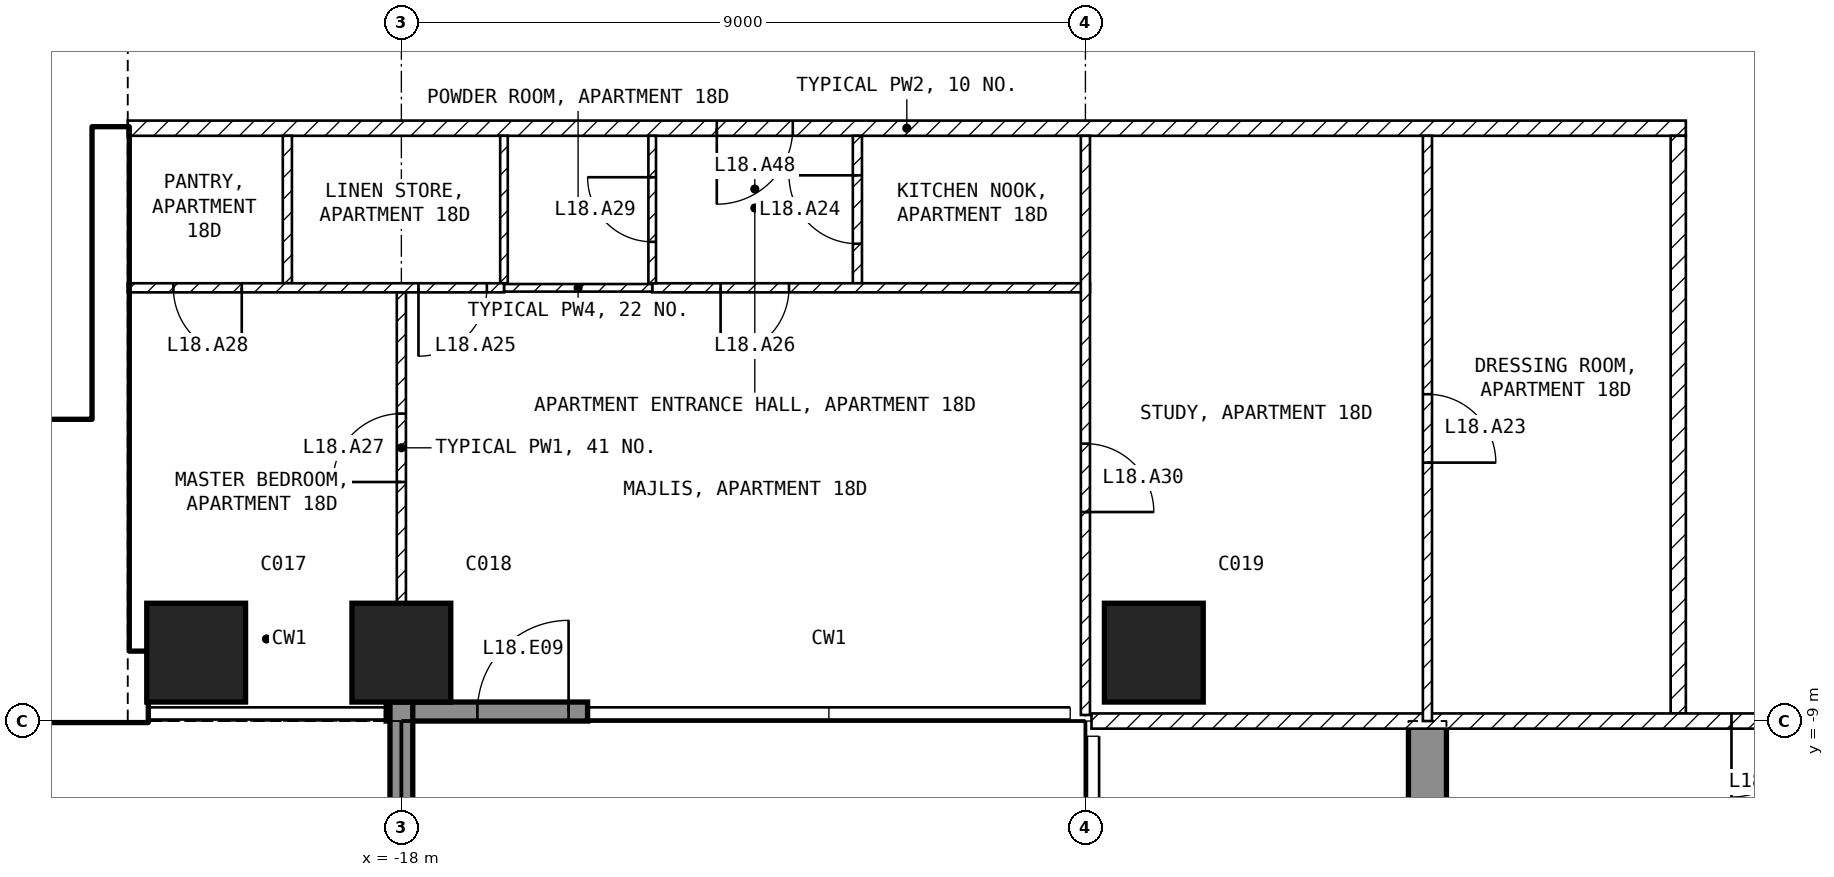
"""IFC4 building model, lengths in metres.
Left out: names, types, materials, properties, quantities, classifications, styles, units other than length and angle.
Written with IfcOpenShell. Run it as: python <this file> out.ifc"""

import sys

from ifc_helpers import new_model, si_unit, direction, frame, frame_2d, origin, origin_2d, place, context, subcontext, project, spatial, polyline, rectangle, outline, extrude, element, fill, save


model = new_model("IFC4")
c1 = context("Model", 3, precision=1e-05, world=origin(), true_north=direction((0.0, 1.0)))
c2 = subcontext(c1, "Body", "Model", "MODEL_VIEW")
j1 = project(units=[si_unit("LENGTHUNIT", "METRE"), si_unit("PLANEANGLEUNIT", "RADIAN")], contexts=[c1])
p1 = place(None, origin())
s1 = spatial("IfcSite", under=j1, at=p1, CompositionType="ELEMENT")
p2 = place(p1, origin())
s2 = spatial("IfcBuilding", under=s1, at=p2, CompositionType="ELEMENT")
p3 = place(p2, frame((0.0, 0.0, 82.0)))
s3 = spatial("IfcBuildingStorey", under=s2, at=p3, CompositionType="ELEMENT", Elevation=82.0)
for number, where, z_axis, x_axis in (
    (1, (-20.7, -8.1, -0.25), (0.0, 0.0, 1.0), (1.0, 0.0, 0.0)),
    (2, (-18.0, -8.1, -0.25), (0.0, 0.0, 1.0), (1.0, 0.0, 0.0)),
    (3, (-8.1, -8.1, -0.25), (0.0, 0.0, 1.0), (1.0, 0.0, 0.0)),
):
    element("IfcColumn", number, at=place(p3, frame(where, z_axis=z_axis, x_axis=x_axis)), inside=s3, PredefinedType="COLUMN", context=c2, shape_type="SweptSolid", body=[
        extrude(rectangle(XDim=1.3, YDim=1.3, at=origin_2d()), origin(), (0.0, 0.0, 1.0), 3.5),
    ])
p4 = place(p3, frame((-4.75, -25.45, -0.25), z_axis=(1.0, 0.0, 0.0), x_axis=(0.0, 1.0, 0.0)))
e4 = element("IfcWall", 4, at=p4, inside=s3, PredefinedType="SHEAR", context=c2, shape_type="SweptSolid", body=[
    extrude(outline(polyline([(0.0, 0.0), (4.15, 0.0), (4.15, 2.65), (6.55, 2.65), (6.55, 0.0), (11.95, 0.0), (11.95, 2.65), (14.35, 2.65), (14.35, 0.0), (16.45, 0.0), (16.45, 3.5), (0.0, 3.5), (0.0, 0.0)])), origin(), (0.0, 0.0, 1.0), 0.5),
])
p5 = place(p3, frame((-18.2, -8.875, 0.0), z_axis=(0.0, 0.0, 1.0), x_axis=(1.0, 0.0, 0.0)))
e5 = element("IfcWall", 5, at=p5, inside=s3, PredefinedType="SOLIDWALL", context=c2, shape_type="SweptSolid", body=[
    extrude(rectangle(XDim=2.65, YDim=0.25, at=frame_2d((1.325, 0.0))), origin(), (0.0, 0.0, 1.0), 3.25),
])
p6 = place(p5, frame((1.2, 0.0, 0.0)))
e6 = element("IfcOpeningElement", 6, at=p6, cuts=e5, PredefinedType="OPENING", context=c2, shape_type="SweptSolid", body=[
    extrude(rectangle(XDim=1.2, YDim=2.4, at=frame_2d((0.6, 1.2))), frame((0.0, 0.135, 0.0), z_axis=(0.0, -1.0, 0.0), x_axis=(1.0, 0.0, 0.0)), (0.0, 0.0, 1.0), 0.27),
])
p7 = place(p3, frame((-18.0, -8.75, 0.0), z_axis=(0.0, 0.0, 1.0), x_axis=(0.0, -1.0, 0.0)))
e7 = element("IfcWall", 7, at=p7, inside=s3, PredefinedType="SOLIDWALL", context=c2, shape_type="SweptSolid", body=[
    extrude(rectangle(XDim=2.95, YDim=0.3, at=frame_2d((1.475, 0.0))), origin(), (0.0, 0.0, 1.0), 3.25),
])
p8 = place(p3, frame((-32.4, -8.55, 0.0), z_axis=(0.0, 0.0, 1.0), x_axis=(1.0, 0.0, 0.0)))
e8 = element("IfcWall", 8, at=p8, inside=s3, PredefinedType="SHEAR", context=c2, shape_type="SweptSolid", body=[
    extrude(rectangle(XDim=11.05, YDim=0.9, at=frame_2d((5.525, 0.0))), origin(), (0.0, 0.0, 1.0), 3.25),
])
p9 = place(p3, frame((-21.825, -8.1, 0.0), z_axis=(0.0, 0.0, 1.0), x_axis=(0.0, 1.0, 0.0)))
e9 = element("IfcWall", 9, at=p9, inside=s3, PredefinedType="SHEAR", context=c2, shape_type="SweptSolid", body=[
    extrude(rectangle(XDim=6.9, YDim=0.45, at=frame_2d((3.45, 0.0))), origin(), (0.0, 0.0, 1.0), 3.25),
])
p10 = place(p3, frame((-28.35, -5.15, 0.0), z_axis=(0.0, 0.0, 1.0), x_axis=(1.0, 0.0, 0.0)))
e10 = element("IfcWall", 10, at=p10, inside=s3, PredefinedType="SOLIDWALL", context=c2, shape_type="SweptSolid", body=[
    extrude(rectangle(XDim=6.3, YDim=0.2, at=frame_2d((3.15, 0.0))), origin(), (0.0, 0.0, 1.0), 3.25),
])
p11 = place(p10, frame((5.1, 0.0, 0.0)))
e11 = element("IfcOpeningElement", 11, at=p11, cuts=e10, PredefinedType="OPENING", context=c2, shape_type="SweptSolid", body=[
    extrude(rectangle(XDim=1.0, YDim=2.1, at=frame_2d((0.5, 1.05))), frame((0.0, 0.11, 0.0), z_axis=(0.0, -1.0, 0.0), x_axis=(1.0, 0.0, 0.0)), (0.0, 0.0, 1.0), 0.22),
])
p12 = place(p3, frame((-1.1, -1.2, 0.0), z_axis=(0.0, 0.0, 1.0), x_axis=(-1.0, 0.0, 0.0)))
e12 = element("IfcWall", 12, at=p12, inside=s3, PredefinedType="PARTITIONING", context=c2, shape_type="SweptSolid", body=[
    extrude(rectangle(XDim=20.5, YDim=0.2, at=frame_2d((10.25, 0.0))), origin(), (0.0, 0.0, 1.0), 3.25),
])
p13 = place(p12, frame((11.75, 0.0, 0.0)))
e13 = element("IfcOpeningElement", 13, at=p13, cuts=e12, PredefinedType="OPENING", context=c2, shape_type="SweptSolid", body=[
    extrude(rectangle(XDim=1.0, YDim=2.1, at=frame_2d((0.5, 1.05))), frame((0.0, 0.11, 0.0), z_axis=(0.0, -1.0, 0.0), x_axis=(1.0, 0.0, 0.0)), (0.0, 0.0, 1.0), 0.22),
])
p14 = place(p3, frame((-1.2, -8.9, 0.0), z_axis=(0.0, 0.0, 1.0), x_axis=(0.0, 1.0, 0.0)))
e14 = element("IfcWall", 14, at=p14, inside=s3, PredefinedType="PARTITIONING", context=c2, shape_type="SweptSolid", body=[
    extrude(rectangle(XDim=7.6, YDim=0.2, at=frame_2d((3.8, 0.0))), origin(), (0.0, 0.0, 1.0), 3.25),
])
p15 = place(p3, frame((8.92, -9.0, 0.0), z_axis=(0.0, 0.0, 1.0), x_axis=(-1.0, 0.0, 0.0)))
e15 = element("IfcWall", 15, at=p15, inside=s3, PredefinedType="PARTITIONING", context=c2, shape_type="SweptSolid", body=[
    extrude(rectangle(XDim=17.84, YDim=0.2, at=frame_2d((8.92, 0.0))), origin(), (0.0, 0.0, 1.0), 3.25),
])
p16 = place(p15, frame((8.42, 0.0, 0.0)))
e16 = element("IfcOpeningElement", 16, at=p16, cuts=e15, PredefinedType="OPENING", context=c2, shape_type="SweptSolid", body=[
    extrude(rectangle(XDim=1.0, YDim=2.1, at=frame_2d((0.5, 1.05))), frame((0.0, 0.11, 0.0), z_axis=(0.0, -1.0, 0.0), x_axis=(1.0, 0.0, 0.0)), (0.0, 0.0, 1.0), 0.22),
])
p17 = place(p3, frame((-12.0, -3.24, 0.0), z_axis=(0.0, 0.0, 1.0), x_axis=(0.0, 1.0, 0.0)))
e17 = element("IfcWall", 17, at=p17, inside=s3, PredefinedType="PARTITIONING", context=c2, shape_type="SweptSolid", body=[
    extrude(rectangle(XDim=1.94, YDim=0.12, at=frame_2d((0.97, 0.0))), origin(), (0.0, 0.0, 1.0), 3.25),
])
p18 = place(p17, frame((0.52, 0.0, 0.0)))
e18 = element("IfcOpeningElement", 18, at=p18, cuts=e17, PredefinedType="OPENING", context=c2, shape_type="SweptSolid", body=[
    extrude(rectangle(XDim=0.9, YDim=2.1, at=frame_2d((0.45, 1.05))), frame((0.0, 0.07, 0.0), z_axis=(0.0, -1.0, 0.0), x_axis=(1.0, 0.0, 0.0)), (0.0, 0.0, 1.0), 0.14),
])
p19 = place(p3, frame((-8.94, -3.3, 0.0), z_axis=(0.0, 0.0, 1.0), x_axis=(-1.0, 0.0, 0.0)))
e19 = element("IfcWall", 19, at=p19, inside=s3, PredefinedType="PARTITIONING", context=c2, shape_type="SweptSolid", body=[
    extrude(rectangle(XDim=5.76, YDim=0.12, at=frame_2d((2.88, 0.0))), origin(), (0.0, 0.0, 1.0), 3.25),
])
p20 = place(p19, frame((3.96, 0.0, 0.0)))
e20 = element("IfcOpeningElement", 20, at=p20, cuts=e19, PredefinedType="OPENING", context=c2, shape_type="SweptSolid", body=[
    extrude(rectangle(XDim=0.9, YDim=2.1, at=frame_2d((0.45, 1.05))), frame((0.0, 0.07, 0.0), z_axis=(0.0, -1.0, 0.0), x_axis=(1.0, 0.0, 0.0)), (0.0, 0.0, 1.0), 0.14),
])
p21 = place(p3, frame((-9.0, -1.3, 0.0), z_axis=(0.0, 0.0, 1.0), x_axis=(0.0, -1.0, 0.0)))
e21 = element("IfcWall", 21, at=p21, inside=s3, PredefinedType="PARTITIONING", context=c2, shape_type="SweptSolid", body=[
    extrude(rectangle(XDim=7.62, YDim=0.12, at=frame_2d((3.81, 0.0))), origin(), (0.0, 0.0, 1.0), 3.25),
])
p22 = place(p21, frame((4.05, 0.0, 0.0)))
e22 = element("IfcOpeningElement", 22, at=p22, cuts=e21, PredefinedType="OPENING", context=c2, shape_type="SweptSolid", body=[
    extrude(rectangle(XDim=0.9, YDim=2.1, at=frame_2d((0.45, 1.05))), frame((0.0, 0.07, 0.0), z_axis=(0.0, -1.0, 0.0), x_axis=(1.0, 0.0, 0.0)), (0.0, 0.0, 1.0), 0.14),
])
p23 = place(p3, frame((-14.7, -3.24, 0.0), z_axis=(0.0, 0.0, 1.0), x_axis=(0.0, 1.0, 0.0)))
e23 = element("IfcWall", 23, at=p23, inside=s3, PredefinedType="PARTITIONING", context=c2, shape_type="SweptSolid", body=[
    extrude(rectangle(XDim=1.94, YDim=0.1, at=frame_2d((0.97, 0.0))), origin(), (0.0, 0.0, 1.0), 3.25),
])
p24 = place(p23, frame((0.545, 0.0, 0.0)))
e24 = element("IfcOpeningElement", 24, at=p24, cuts=e23, PredefinedType="OPENING", context=c2, shape_type="SweptSolid", body=[
    extrude(rectangle(XDim=0.85, YDim=2.1, at=frame_2d((0.425, 1.05))), frame((0.0, 0.06, 0.0), z_axis=(0.0, -1.0, 0.0), x_axis=(1.0, 0.0, 0.0)), (0.0, 0.0, 1.0), 0.12),
])
p25 = place(p3, frame((-16.65, -3.24, 0.0), z_axis=(0.0, 0.0, 1.0), x_axis=(0.0, 1.0, 0.0)))
e25 = element("IfcWall", 25, at=p25, inside=s3, PredefinedType="PARTITIONING", context=c2, shape_type="SweptSolid", body=[
    extrude(rectangle(XDim=1.94, YDim=0.1, at=frame_2d((0.97, 0.0))), origin(), (0.0, 0.0, 1.0), 3.25),
])
p26 = place(p3, frame((-14.7, -3.3, 0.0), z_axis=(0.0, 0.0, 1.0), x_axis=(-1.0, 0.0, 0.0)))
e26 = element("IfcWall", 26, at=p26, inside=s3, PredefinedType="PARTITIONING", context=c2, shape_type="SweptSolid", body=[
    extrude(rectangle(XDim=1.95, YDim=0.1, at=frame_2d((0.975, 0.0))), origin(), (0.0, 0.0, 1.0), 3.25),
])
p27 = place(p3, frame((-19.5, -3.24, 0.0), z_axis=(0.0, 0.0, 1.0), x_axis=(0.0, 1.0, 0.0)))
e27 = element("IfcWall", 27, at=p27, inside=s3, PredefinedType="PARTITIONING", context=c2, shape_type="SweptSolid", body=[
    extrude(rectangle(XDim=1.94, YDim=0.12, at=frame_2d((0.97, 0.0))), origin(), (0.0, 0.0, 1.0), 3.25),
])
p28 = place(p3, frame((-16.65, -3.3, 0.0), z_axis=(0.0, 0.0, 1.0), x_axis=(-1.0, 0.0, 0.0)))
e28 = element("IfcWall", 28, at=p28, inside=s3, PredefinedType="PARTITIONING", context=c2, shape_type="SweptSolid", body=[
    extrude(rectangle(XDim=4.95, YDim=0.12, at=frame_2d((2.475, 0.0))), origin(), (0.0, 0.0, 1.0), 3.25),
])
p29 = place(p28, frame((0.225, 0.0, 0.0)))
e29 = element("IfcOpeningElement", 29, at=p29, cuts=e28, PredefinedType="OPENING", context=c2, shape_type="SweptSolid", body=[
    extrude(rectangle(XDim=0.9, YDim=2.1, at=frame_2d((0.45, 1.05))), frame((0.0, 0.07, 0.0), z_axis=(0.0, -1.0, 0.0), x_axis=(1.0, 0.0, 0.0)), (0.0, 0.0, 1.0), 0.14),
])
p30 = place(p28, frame((3.45, 0.0, 0.0)))
e30 = element("IfcOpeningElement", 30, at=p30, cuts=e28, PredefinedType="OPENING", context=c2, shape_type="SweptSolid", body=[
    extrude(rectangle(XDim=0.9, YDim=2.1, at=frame_2d((0.45, 1.05))), frame((0.0, 0.07, 0.0), z_axis=(0.0, -1.0, 0.0), x_axis=(1.0, 0.0, 0.0)), (0.0, 0.0, 1.0), 0.14),
])
p31 = place(p3, frame((-18.0, -7.45, 0.0), z_axis=(0.0, 0.0, 1.0), x_axis=(0.0, 1.0, 0.0)))
e31 = element("IfcWall", 31, at=p31, inside=s3, PredefinedType="PARTITIONING", context=c2, shape_type="SweptSolid", body=[
    extrude(rectangle(XDim=4.09, YDim=0.12, at=frame_2d((2.045, 0.0))), origin(), (0.0, 0.0, 1.0), 2.346),
])
p32 = place(p31, frame((1.595, 0.0, 0.0)))
e32 = element("IfcOpeningElement", 32, at=p32, cuts=e31, PredefinedType="OPENING", context=c2, shape_type="SweptSolid", body=[
    extrude(rectangle(XDim=0.9, YDim=2.1, at=frame_2d((0.45, 1.05))), frame((0.0, 0.07, 0.0), z_axis=(0.0, -1.0, 0.0), x_axis=(1.0, 0.0, 0.0)), (0.0, 0.0, 1.0), 0.14),
])
p33 = place(p3, frame((-4.5, -1.3, 0.0), z_axis=(0.0, 0.0, 1.0), x_axis=(0.0, -1.0, 0.0)))
e33 = element("IfcWall", 33, at=p33, inside=s3, PredefinedType="PARTITIONING", context=c2, shape_type="SweptSolid", body=[
    extrude(rectangle(XDim=7.7, YDim=0.12, at=frame_2d((3.85, 0.0))), origin(), (0.0, 0.0, 1.0), 3.25),
])
p34 = place(p33, frame((3.4, 0.0, 0.0)))
e34 = element("IfcOpeningElement", 34, at=p34, cuts=e33, PredefinedType="OPENING", context=c2, shape_type="SweptSolid", body=[
    extrude(rectangle(XDim=0.9, YDim=2.1, at=frame_2d((0.45, 1.05))), frame((0.0, 0.07, 0.0), z_axis=(0.0, -1.0, 0.0), x_axis=(1.0, 0.0, 0.0)), (0.0, 0.0, 1.0), 0.14),
])
p35 = place(p6, origin())
e35 = element("IfcDoor", 35, at=p35, inside=s3, OperationType="SINGLE_SWING_RIGHT", PredefinedType="DOOR", context=c2, shape_type="SweptSolid", body=[
    extrude(rectangle(XDim=1.2, YDim=2.4, at=frame_2d((0.6, 1.2))), frame((0.0, 0.025, 0.0), z_axis=(0.0, -1.0, 0.0), x_axis=(1.0, 0.0, 0.0)), (0.0, 0.0, 1.0), 0.05),
])
fill(e6, e35)
p36 = place(p11, origin())
e36 = element("IfcDoor", 36, at=p36, inside=s3, OperationType="SINGLE_SWING_LEFT", PredefinedType="DOOR", context=c2, shape_type="SweptSolid", body=[
    extrude(rectangle(XDim=1.0, YDim=2.1, at=frame_2d((0.5, 1.05))), frame((0.0, 0.025, 0.0), z_axis=(0.0, -1.0, 0.0), x_axis=(1.0, 0.0, 0.0)), (0.0, 0.0, 1.0), 0.05),
])
fill(e11, e36)
p37 = place(p34, origin())
e37 = element("IfcDoor", 37, at=p37, inside=s3, OperationType="SINGLE_SWING_RIGHT", PredefinedType="DOOR", context=c2, shape_type="SweptSolid", body=[
    extrude(rectangle(XDim=0.9, YDim=2.1, at=frame_2d((0.45, 1.05))), frame((0.0, 0.025, 0.0), z_axis=(0.0, -1.0, 0.0), x_axis=(1.0, 0.0, 0.0)), (0.0, 0.0, 1.0), 0.05),
])
fill(e34, e37)
p38 = place(p18, origin())
e38 = element("IfcDoor", 38, at=p38, inside=s3, OperationType="SINGLE_SWING_RIGHT", PredefinedType="DOOR", context=c2, shape_type="SweptSolid", body=[
    extrude(rectangle(XDim=0.9, YDim=2.1, at=frame_2d((0.45, 1.05))), frame((0.0, 0.025, 0.0), z_axis=(0.0, -1.0, 0.0), x_axis=(1.0, 0.0, 0.0)), (0.0, 0.0, 1.0), 0.05),
])
fill(e18, e38)
p39 = place(p29, origin())
e39 = element("IfcDoor", 39, at=p39, inside=s3, OperationType="SINGLE_SWING_RIGHT", PredefinedType="DOOR", context=c2, shape_type="SweptSolid", body=[
    extrude(rectangle(XDim=0.9, YDim=2.1, at=frame_2d((0.45, 1.05))), frame((0.0, 0.025, 0.0), z_axis=(0.0, -1.0, 0.0), x_axis=(1.0, 0.0, 0.0)), (0.0, 0.0, 1.0), 0.05),
])
fill(e29, e39)
p40 = place(p20, origin())
e40 = element("IfcDoor", 40, at=p40, inside=s3, OperationType="SINGLE_SWING_RIGHT", PredefinedType="DOOR", context=c2, shape_type="SweptSolid", body=[
    extrude(rectangle(XDim=0.9, YDim=2.1, at=frame_2d((0.45, 1.05))), frame((0.0, 0.025, 0.0), z_axis=(0.0, -1.0, 0.0), x_axis=(1.0, 0.0, 0.0)), (0.0, 0.0, 1.0), 0.05),
])
fill(e20, e40)
p41 = place(p32, origin())
e41 = element("IfcDoor", 41, at=p41, inside=s3, OperationType="SINGLE_SWING_LEFT", PredefinedType="DOOR", context=c2, shape_type="SweptSolid", body=[
    extrude(rectangle(XDim=0.9, YDim=2.1, at=frame_2d((0.45, 1.05))), frame((0.0, 0.025, 0.0), z_axis=(0.0, -1.0, 0.0), x_axis=(1.0, 0.0, 0.0)), (0.0, 0.0, 1.0), 0.05),
])
fill(e32, e41)
p42 = place(p30, origin())
e42 = element("IfcDoor", 42, at=p42, inside=s3, OperationType="SINGLE_SWING_LEFT", PredefinedType="DOOR", context=c2, shape_type="SweptSolid", body=[
    extrude(rectangle(XDim=0.9, YDim=2.1, at=frame_2d((0.45, 1.05))), frame((0.0, 0.025, 0.0), z_axis=(0.0, -1.0, 0.0), x_axis=(1.0, 0.0, 0.0)), (0.0, 0.0, 1.0), 0.05),
])
fill(e30, e42)
p43 = place(p24, origin())
e43 = element("IfcDoor", 43, at=p43, inside=s3, OperationType="SINGLE_SWING_RIGHT", PredefinedType="DOOR", context=c2, shape_type="SweptSolid", body=[
    extrude(rectangle(XDim=0.85, YDim=2.1, at=frame_2d((0.425, 1.05))), frame((0.0, 0.025, 0.0), z_axis=(0.0, -1.0, 0.0), x_axis=(1.0, 0.0, 0.0)), (0.0, 0.0, 1.0), 0.05),
])
fill(e24, e43)
p44 = place(p22, origin())
e44 = element("IfcDoor", 44, at=p44, inside=s3, OperationType="SINGLE_SWING_RIGHT", PredefinedType="DOOR", context=c2, shape_type="SweptSolid", body=[
    extrude(rectangle(XDim=0.9, YDim=2.1, at=frame_2d((0.45, 1.05))), frame((0.0, 0.025, 0.0), z_axis=(0.0, -1.0, 0.0), x_axis=(1.0, 0.0, 0.0)), (0.0, 0.0, 1.0), 0.05),
])
fill(e22, e44)
p45 = place(p16, origin())
e45 = element("IfcDoor", 45, at=p45, inside=s3, OperationType="SINGLE_SWING_RIGHT", PredefinedType="DOOR", context=c2, shape_type="SweptSolid", body=[
    extrude(rectangle(XDim=1.0, YDim=2.1, at=frame_2d((0.5, 1.05))), frame((0.0, 0.025, 0.0), z_axis=(0.0, -1.0, 0.0), x_axis=(1.0, 0.0, 0.0)), (0.0, 0.0, 1.0), 0.05),
])
fill(e16, e45)
p46 = place(p13, origin())
e46 = element("IfcDoor", 46, at=p46, inside=s3, OperationType="SINGLE_SWING_RIGHT", PredefinedType="DOOR", context=c2, shape_type="SweptSolid", body=[
    extrude(rectangle(XDim=1.0, YDim=2.1, at=frame_2d((0.5, 1.05))), frame((0.0, 0.025, 0.0), z_axis=(0.0, -1.0, 0.0), x_axis=(1.0, 0.0, 0.0)), (0.0, 0.0, 1.0), 0.05),
])
fill(e13, e46)
save(model, sys.argv[1])
